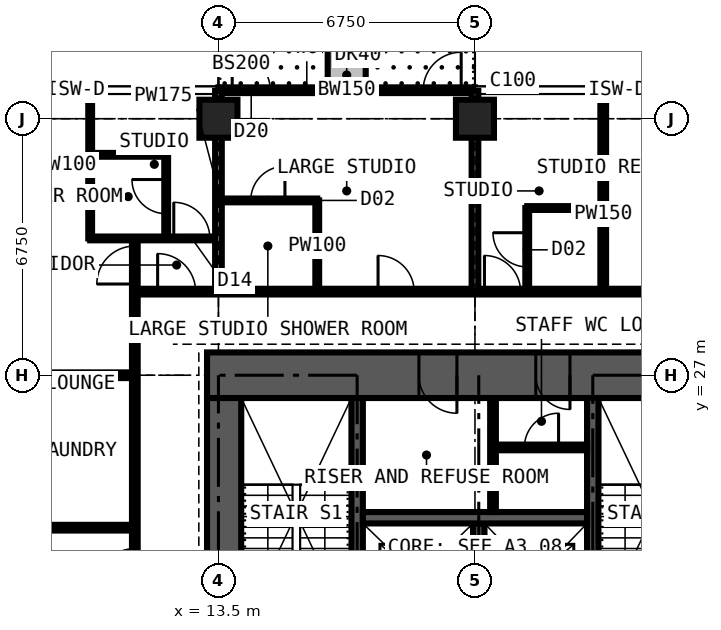
"""IFC4 building model, lengths in metres.
Left out: names, types, materials, properties, quantities, classifications, styles, units other than length and angle.
Written with IfcOpenShell. Run it as: python <this file> out.ifc"""

import sys

from ifc_helpers import new_model, si_unit, direction, frame, frame_2d, origin, origin_2d, place, context, subcontext, project, spatial, rectangle, extrude, element, fill, save


model = new_model("IFC4")
c1 = context("Model", 3, precision=1e-05, world=origin(), true_north=direction((0.0, 1.0)))
c2 = subcontext(c1, "Body", "Model", "MODEL_VIEW")
j1 = project(units=[si_unit("LENGTHUNIT", "METRE"), si_unit("PLANEANGLEUNIT", "RADIAN")], contexts=[c1])
p1 = place(None, origin())
s1 = spatial("IfcSite", under=j1, at=p1, CompositionType="ELEMENT")
p2 = place(p1, origin())
s2 = spatial("IfcBuilding", under=s1, at=p2, CompositionType="ELEMENT")
p3 = place(p2, frame((0.0, 0.0, 247.5)))
s3 = spatial("IfcBuildingStorey", under=s2, at=p3, CompositionType="ELEMENT", Elevation=247.5)
for number, where, z_axis, x_axis in (
    (1, (13.5, 33.75, 0.0), (0.0, 0.0, 1.0), (1.0, 0.0, 0.0)),
    (2, (20.25, 33.75, 0.0), (0.0, 0.0, 1.0), (1.0, 0.0, 0.0)),
):
    element("IfcColumn", number, at=place(p3, frame(where, z_axis=z_axis, x_axis=x_axis)), inside=s3, PredefinedType="COLUMN", context=c2, shape_type="SweptSolid", body=[
        extrude(rectangle(XDim=1.0, YDim=1.0, at=origin_2d()), origin(), (0.0, 0.0, 1.0), 3.6),
    ])
p4 = place(p3, frame((27.3, 27.0, 0.0), z_axis=(0.0, 0.0, 1.0), x_axis=(-1.0, 0.0, 0.0)))
e3 = element("IfcWall", 3, at=p4, inside=s3, PredefinedType="SHEAR", context=c2, shape_type="SweptSolid", body=[
    extrude(rectangle(XDim=14.1, YDim=1.2, at=frame_2d((7.05, 0.0))), origin(), (0.0, 0.0, 1.0), 3.6),
])
p5 = place(p4, frame((4.55, 0.0, 0.0)))
e4 = element("IfcOpeningElement", 4, at=p5, cuts=e3, PredefinedType="OPENING", context=c2, shape_type="SweptSolid", body=[
    extrude(rectangle(XDim=0.9, YDim=2.2, at=frame_2d((0.45, 1.1))), frame((0.0, 0.61, 0.0), z_axis=(0.0, -1.0, 0.0), x_axis=(1.0, 0.0, 0.0)), (0.0, 0.0, 1.0), 1.22),
])
p6 = place(p4, frame((7.525, 0.0, 0.0)))
e5 = element("IfcOpeningElement", 5, at=p6, cuts=e3, PredefinedType="OPENING", context=c2, shape_type="SweptSolid", body=[
    extrude(rectangle(XDim=1.0, YDim=2.2, at=frame_2d((0.5, 1.1))), frame((0.0, 0.61, 0.0), z_axis=(0.0, -1.0, 0.0), x_axis=(1.0, 0.0, 0.0)), (0.0, 0.0, 1.0), 1.22),
])
p7 = place(p3, frame((13.65, 26.4, 0.0), z_axis=(0.0, 0.0, 1.0), x_axis=(0.0, -1.0, 0.0)))
e6 = element("IfcWall", 6, at=p7, inside=s3, PredefinedType="SHEAR", context=c2, shape_type="SweptSolid", body=[
    extrude(rectangle(XDim=12.3, YDim=0.9, at=frame_2d((6.15, 0.0))), origin(), (0.0, 0.0, 1.0), 3.6),
])
p8 = place(p7, frame((7.45, 0.0, 0.0)))
e7 = element("IfcOpeningElement", 7, at=p8, cuts=e6, PredefinedType="OPENING", context=c2, shape_type="SweptSolid", body=[
    extrude(rectangle(XDim=1.2, YDim=2.2, at=frame_2d((0.6, 1.1))), frame((0.0, 0.46, 0.0), z_axis=(0.0, -1.0, 0.0), x_axis=(1.0, 0.0, 0.0)), (0.0, 0.0, 1.0), 0.92),
])
p9 = place(p3, frame((13.5, 34.5, 0.0), z_axis=(0.0, 0.0, 1.0), x_axis=(1.0, 0.0, 0.0)))
e8 = element("IfcWall", 8, at=p9, inside=s3, PredefinedType="SOLIDWALL", context=c2, shape_type="SweptSolid", body=[
    extrude(rectangle(XDim=6.75, YDim=0.15, at=frame_2d((3.375, 0.0))), origin(), (0.0, 0.0, 1.0), 3.375),
])
p10 = place(p9, frame((0.363, 0.0, 0.0)))
e9 = element("IfcOpeningElement", 9, at=p10, cuts=e8, PredefinedType="OPENING", context=c2, shape_type="SweptSolid", body=[
    extrude(rectangle(XDim=1.0, YDim=2.2, at=frame_2d((0.5, 1.1))), frame((0.0, 0.085, 0.0), z_axis=(0.0, -1.0, 0.0), x_axis=(1.0, 0.0, 0.0)), (0.0, 0.0, 1.0), 0.17),
])
p11 = place(p9, frame((1.725, 0.0, 0.9)))
e10 = element("IfcOpeningElement", 10, at=p11, cuts=e8, PredefinedType="OPENING", context=c2, shape_type="SweptSolid", body=[
    extrude(rectangle(XDim=1.2, YDim=1.8, at=frame_2d((0.6, 0.9))), frame((0.0, 0.085, 0.0), z_axis=(0.0, -1.0, 0.0), x_axis=(1.0, 0.0, 0.0)), (0.0, 0.0, 1.0), 0.17),
])
p12 = place(p9, frame((5.387, 0.0, 0.0)))
e11 = element("IfcOpeningElement", 11, at=p12, cuts=e8, PredefinedType="OPENING", context=c2, shape_type="SweptSolid", body=[
    extrude(rectangle(XDim=1.0, YDim=2.2, at=frame_2d((0.5, 1.1))), frame((0.0, 0.085, 0.0), z_axis=(0.0, -1.0, 0.0), x_axis=(1.0, 0.0, 0.0)), (0.0, 0.0, 1.0), 0.17),
])
p13 = place(p9, frame((3.825, 0.0, 0.9)))
e12 = element("IfcOpeningElement", 12, at=p13, cuts=e8, PredefinedType="OPENING", context=c2, shape_type="SweptSolid", body=[
    extrude(rectangle(XDim=1.2, YDim=1.8, at=frame_2d((0.6, 0.9))), frame((0.0, 0.085, 0.0), z_axis=(0.0, -1.0, 0.0), x_axis=(1.0, 0.0, 0.0)), (0.0, 0.0, 1.0), 0.17),
])
p14 = place(p3, frame((16.875, 34.6, 0.0), z_axis=(0.0, 0.0, 1.0), x_axis=(0.0, 1.0, 0.0)))
e13 = element("IfcWall", 13, at=p14, inside=s3, PredefinedType="USERDEFINED", context=c2, shape_type="SweptSolid", body=[
    extrude(rectangle(XDim=2.2, YDim=1.0, at=frame_2d((1.1, 0.0))), origin(), (0.0, 0.0, 1.0), 0.9),
])
for number, where, z_axis, x_axis in (
    (14, (17.15, 20.3, 0.0), (0.0, 0.0, 1.0), (0.0, 1.0, 0.0)),
    (15, (23.35, 20.3, 0.0), (0.0, 0.0, 1.0), (0.0, 1.0, 0.0)),
):
    element("IfcWall", number, at=place(p3, frame(where, z_axis=z_axis, x_axis=x_axis)), inside=s3, PredefinedType="SHEAR", context=c2, shape_type="SweptSolid", body=[
        extrude(rectangle(XDim=6.1, YDim=0.3, at=frame_2d((3.05, 0.0))), origin(), (0.0, 0.0, 1.0), 3.6),
    ])
p15 = place(p3, frame((20.35, 20.3, 0.0), z_axis=(0.0, 0.0, 1.0), x_axis=(0.0, 1.0, 0.0)))
e16 = element("IfcWall", 16, at=p15, inside=s3, PredefinedType="SHEAR", context=c2, shape_type="SweptSolid", body=[
    extrude(rectangle(XDim=2.8, YDim=0.3, at=frame_2d((1.4, 0.0))), origin(), (0.0, 0.0, 1.0), 3.6),
])
p16 = place(p3, frame((17.3, 23.25, 0.0), z_axis=(0.0, 0.0, 1.0), x_axis=(1.0, 0.0, 0.0)))
e17 = element("IfcWall", 17, at=p16, inside=s3, PredefinedType="SHEAR", context=c2, shape_type="SweptSolid", body=[
    extrude(rectangle(XDim=5.9, YDim=0.3, at=frame_2d((2.95, 0.0))), origin(), (0.0, 0.0, 1.0), 3.6),
])
p17 = place(p3, frame((20.725, 23.4, 0.0), z_axis=(0.0, 0.0, 1.0), x_axis=(0.0, 1.0, 0.0)))
e18 = element("IfcWall", 18, at=p17, inside=s3, PredefinedType="PARTITIONING", context=c2, shape_type="SweptSolid", body=[
    extrude(rectangle(XDim=3.0, YDim=0.15, at=frame_2d((1.5, 0.0))), origin(), (0.0, 0.0, 1.0), 3.375),
])
p18 = place(p3, frame((20.8, 25.1, 0.0), z_axis=(0.0, 0.0, 1.0), x_axis=(1.0, 0.0, 0.0)))
e19 = element("IfcWall", 19, at=p18, inside=s3, PredefinedType="PARTITIONING", context=c2, shape_type="SweptSolid", body=[
    extrude(rectangle(XDim=2.4, YDim=0.15, at=frame_2d((1.2, 0.0))), origin(), (0.0, 0.0, 1.0), 3.375),
])
p19 = place(p18, frame((0.75, 0.0, 0.0)))
e20 = element("IfcOpeningElement", 20, at=p19, cuts=e19, PredefinedType="OPENING", context=c2, shape_type="SweptSolid", body=[
    extrude(rectangle(XDim=0.9, YDim=2.2, at=frame_2d((0.45, 1.1))), frame((0.0, 0.085, 0.0), z_axis=(0.0, -1.0, 0.0), x_axis=(1.0, 0.0, 0.0)), (0.0, 0.0, 1.0), 0.17),
])
p20 = place(p3, frame((3.35, 27.0, 0.0), z_axis=(0.0, 0.0, 1.0), x_axis=(1.0, 0.0, 0.0)))
e21 = element("IfcWall", 21, at=p20, inside=s3, PredefinedType="PARTITIONING", context=c2, shape_type="SweptSolid", body=[
    extrude(rectangle(XDim=7.95, YDim=0.15, at=frame_2d((3.975, 0.0))), origin(), (0.0, 0.0, 1.0), 2.877),
])
p21 = place(p3, frame((4.85, 22.988, 0.0), z_axis=(0.0, 0.0, 1.0), x_axis=(1.0, 0.0, 0.0)))
e22 = element("IfcWall", 22, at=p21, inside=s3, PredefinedType="PARTITIONING", context=c2, shape_type="SweptSolid", body=[
    extrude(rectangle(XDim=6.45, YDim=0.15, at=frame_2d((3.225, 0.0))), origin(), (0.0, 0.0, 1.0), 3.375),
])
p22 = place(p21, frame((2.75, 0.0, 0.0)))
e23 = element("IfcOpeningElement", 23, at=p22, cuts=e22, PredefinedType="OPENING", context=c2, shape_type="SweptSolid", body=[
    extrude(rectangle(XDim=0.95, YDim=2.2, at=frame_2d((0.475, 1.1))), frame((0.0, 0.085, 0.0), z_axis=(0.0, -1.0, 0.0), x_axis=(1.0, 0.0, 0.0)), (0.0, 0.0, 1.0), 0.17),
])
p23 = place(p3, frame((10.125, 30.6, 0.0), z_axis=(0.0, 0.0, 1.0), x_axis=(0.0, 1.0, 0.0)))
e24 = element("IfcWall", 24, at=p23, inside=s3, PredefinedType="PARTITIONING", context=c2, shape_type="SweptSolid", body=[
    extrude(rectangle(XDim=3.884, YDim=0.1, at=frame_2d((1.942, 0.0))), origin(), (0.0, 0.0, 1.0), 3.375),
])
p24 = place(p3, frame((10.125, 30.6, 0.0), z_axis=(0.0, 0.0, 1.0), x_axis=(1.0, 0.0, 0.0)))
e25 = element("IfcWall", 25, at=p24, inside=s3, PredefinedType="PARTITIONING", context=c2, shape_type="SweptSolid", body=[
    extrude(rectangle(XDim=3.375, YDim=0.1, at=frame_2d((1.688, 0.0))), origin(), (0.0, 0.0, 1.0), 3.375),
])
p25 = place(p24, frame((2.2, 0.0, 0.0)))
e26 = element("IfcOpeningElement", 26, at=p25, cuts=e25, PredefinedType="OPENING", context=c2, shape_type="SweptSolid", body=[
    extrude(rectangle(XDim=0.95, YDim=2.2, at=frame_2d((0.475, 1.1))), frame((0.0, 0.06, 0.0), z_axis=(0.0, -1.0, 0.0), x_axis=(1.0, 0.0, 0.0)), (0.0, 0.0, 1.0), 0.12),
])
p26 = place(p3, frame((10.125, 32.8, 0.0), z_axis=(0.0, 0.0, 1.0), x_axis=(1.0, 0.0, 0.0)))
e27 = element("IfcWall", 27, at=p26, inside=s3, PredefinedType="PARTITIONING", context=c2, shape_type="SweptSolid", body=[
    extrude(rectangle(XDim=2.0, YDim=0.1, at=frame_2d((1.0, 0.0))), origin(), (0.0, 0.0, 1.0), 3.375),
])
p27 = place(p3, frame((11.3, 11.3, 0.0), z_axis=(0.0, 0.0, 1.0), x_axis=(0.0, 1.0, 0.0)))
e28 = element("IfcWall", 28, at=p27, inside=s3, PredefinedType="PARTITIONING", context=c2, shape_type="SweptSolid", body=[
    extrude(rectangle(XDim=19.3, YDim=0.15, at=frame_2d((9.65, 0.0))), origin(), (0.0, 0.0, 1.0), 3.375),
])
p28 = place(p27, frame((18.1, 0.0, 0.0)))
e29 = element("IfcOpeningElement", 29, at=p28, cuts=e28, PredefinedType="OPENING", context=c2, shape_type="SweptSolid", body=[
    extrude(rectangle(XDim=1.0, YDim=2.2, at=frame_2d((0.5, 1.1))), frame((0.0, 0.085, 0.0), z_axis=(0.0, -1.0, 0.0), x_axis=(1.0, 0.0, 0.0)), (0.0, 0.0, 1.0), 0.17),
])
p29 = place(p27, frame((10.137, 0.0, 0.0)))
e30 = element("IfcOpeningElement", 30, at=p29, cuts=e28, PredefinedType="OPENING", context=c2, shape_type="SweptSolid", body=[
    extrude(rectangle(XDim=1.0, YDim=2.2, at=frame_2d((0.5, 1.1))), frame((0.0, 0.085, 0.0), z_axis=(0.0, -1.0, 0.0), x_axis=(1.0, 0.0, 0.0)), (0.0, 0.0, 1.0), 0.17),
])
p30 = place(p3, frame((11.3, 29.2, 0.0), z_axis=(0.0, 0.0, 1.0), x_axis=(1.0, 0.0, 0.0)))
e31 = element("IfcWall", 31, at=p30, inside=s3, PredefinedType="PARTITIONING", context=c2, shape_type="SweptSolid", body=[
    extrude(rectangle(XDim=19.809, YDim=0.15, at=frame_2d((9.904, 0.0))), origin(), (0.0, 0.0, 1.0), 3.375),
])
p31 = place(p30, frame((14.625, 0.0, 0.0)))
e32 = element("IfcOpeningElement", 32, at=p31, cuts=e31, PredefinedType="OPENING", context=c2, shape_type="SweptSolid", body=[
    extrude(rectangle(XDim=1.0, YDim=2.2, at=frame_2d((0.5, 1.1))), frame((0.0, 0.085, 0.0), z_axis=(0.0, -1.0, 0.0), x_axis=(1.0, 0.0, 0.0)), (0.0, 0.0, 1.0), 0.17),
])
p32 = place(p30, frame((6.4, 0.0, 0.0)))
e33 = element("IfcOpeningElement", 33, at=p32, cuts=e31, PredefinedType="OPENING", context=c2, shape_type="SweptSolid", body=[
    extrude(rectangle(XDim=0.95, YDim=2.2, at=frame_2d((0.475, 1.1))), frame((0.0, 0.085, 0.0), z_axis=(0.0, -1.0, 0.0), x_axis=(1.0, 0.0, 0.0)), (0.0, 0.0, 1.0), 0.17),
])
p33 = place(p30, frame((9.2, 0.0, 0.0)))
e34 = element("IfcOpeningElement", 34, at=p33, cuts=e31, PredefinedType="OPENING", context=c2, shape_type="SweptSolid", body=[
    extrude(rectangle(XDim=0.95, YDim=2.2, at=frame_2d((0.475, 1.1))), frame((0.0, 0.085, 0.0), z_axis=(0.0, -1.0, 0.0), x_axis=(1.0, 0.0, 0.0)), (0.0, 0.0, 1.0), 0.17),
])
p34 = place(p30, frame((0.6, 0.0, 0.0)))
e35 = element("IfcOpeningElement", 35, at=p34, cuts=e31, PredefinedType="OPENING", context=c2, shape_type="SweptSolid", body=[
    extrude(rectangle(XDim=1.0, YDim=2.2, at=frame_2d((0.5, 1.1))), frame((0.0, 0.085, 0.0), z_axis=(0.0, -1.0, 0.0), x_axis=(1.0, 0.0, 0.0)), (0.0, 0.0, 1.0), 0.17),
])
p35 = place(p3, frame((12.125, 30.6, 0.0), z_axis=(0.0, 0.0, 1.0), x_axis=(0.0, 1.0, 0.0)))
e36 = element("IfcWall", 36, at=p35, inside=s3, PredefinedType="PARTITIONING", context=c2, shape_type="SweptSolid", body=[
    extrude(rectangle(XDim=2.2, YDim=0.1, at=frame_2d((1.1, 0.0))), origin(), (0.0, 0.0, 1.0), 3.375),
])
p36 = place(p35, frame((0.65, 0.0, 0.0)))
e37 = element("IfcOpeningElement", 37, at=p36, cuts=e36, PredefinedType="OPENING", context=c2, shape_type="SweptSolid", body=[
    extrude(rectangle(XDim=0.9, YDim=2.2, at=frame_2d((0.45, 1.1))), frame((0.0, 0.06, 0.0), z_axis=(0.0, -1.0, 0.0), x_axis=(1.0, 0.0, 0.0)), (0.0, 0.0, 1.0), 0.12),
])
p37 = place(p3, frame((13.5, 29.2, 0.0), z_axis=(0.0, 0.0, 1.0), x_axis=(0.0, 1.0, 0.0)))
e38 = element("IfcWall", 38, at=p37, inside=s3, PredefinedType="PARTITIONING", context=c2, shape_type="SweptSolid", body=[
    extrude(rectangle(XDim=5.284, YDim=0.175, at=frame_2d((2.642, 0.0))), origin(), (0.0, 0.0, 1.0), 2.61),
])
p38 = place(p3, frame((13.5, 31.6, 0.0), z_axis=(0.0, 0.0, 1.0), x_axis=(1.0, 0.0, 0.0)))
e39 = element("IfcWall", 39, at=p38, inside=s3, PredefinedType="PARTITIONING", context=c2, shape_type="SweptSolid", body=[
    extrude(rectangle(XDim=2.6, YDim=0.1, at=frame_2d((1.3, 0.0))), origin(), (0.0, 0.0, 1.0), 3.375),
])
p39 = place(p38, frame((0.85, 0.0, 0.0)))
e40 = element("IfcOpeningElement", 40, at=p39, cuts=e39, PredefinedType="OPENING", context=c2, shape_type="SweptSolid", body=[
    extrude(rectangle(XDim=0.9, YDim=2.2, at=frame_2d((0.45, 1.1))), frame((0.0, 0.06, 0.0), z_axis=(0.0, -1.0, 0.0), x_axis=(1.0, 0.0, 0.0)), (0.0, 0.0, 1.0), 0.12),
])
p40 = place(p3, frame((16.1, 29.2, 0.0), z_axis=(0.0, 0.0, 1.0), x_axis=(0.0, 1.0, 0.0)))
e41 = element("IfcWall", 41, at=p40, inside=s3, PredefinedType="PARTITIONING", context=c2, shape_type="SweptSolid", body=[
    extrude(rectangle(XDim=2.4, YDim=0.1, at=frame_2d((1.2, 0.0))), origin(), (0.0, 0.0, 1.0), 3.375),
])
p41 = place(p3, frame((20.25, 29.2, 0.0), z_axis=(0.0, 0.0, 1.0), x_axis=(0.0, 1.0, 0.0)))
e42 = element("IfcWall", 42, at=p41, inside=s3, PredefinedType="PARTITIONING", context=c2, shape_type="SweptSolid", body=[
    extrude(rectangle(XDim=5.284, YDim=0.175, at=frame_2d((2.642, 0.0))), origin(), (0.0, 0.0, 1.0), 2.61),
])
p42 = place(p3, frame((21.625, 29.2, 0.0), z_axis=(0.0, 0.0, 1.0), x_axis=(0.0, 1.0, 0.0)))
e43 = element("IfcWall", 43, at=p42, inside=s3, PredefinedType="PARTITIONING", context=c2, shape_type="SweptSolid", body=[
    extrude(rectangle(XDim=2.2, YDim=0.1, at=frame_2d((1.1, 0.0))), origin(), (0.0, 0.0, 1.0), 3.375),
])
p43 = place(p42, frame((0.65, 0.0, 0.0)))
e44 = element("IfcOpeningElement", 44, at=p43, cuts=e43, PredefinedType="OPENING", context=c2, shape_type="SweptSolid", body=[
    extrude(rectangle(XDim=0.9, YDim=2.2, at=frame_2d((0.45, 1.1))), frame((0.0, 0.06, 0.0), z_axis=(0.0, -1.0, 0.0), x_axis=(1.0, 0.0, 0.0)), (0.0, 0.0, 1.0), 0.12),
])
p44 = place(p3, frame((21.625, 31.4, 0.0), z_axis=(0.0, 0.0, 1.0), x_axis=(1.0, 0.0, 0.0)))
e45 = element("IfcWall", 45, at=p44, inside=s3, PredefinedType="PARTITIONING", context=c2, shape_type="SweptSolid", body=[
    extrude(rectangle(XDim=2.0, YDim=0.1, at=frame_2d((1.0, 0.0))), origin(), (0.0, 0.0, 1.0), 3.375),
])
p45 = place(p3, frame((23.625, 29.2, 0.0), z_axis=(0.0, 0.0, 1.0), x_axis=(0.0, 1.0, 0.0)))
e46 = element("IfcWall", 46, at=p45, inside=s3, PredefinedType="PARTITIONING", context=c2, shape_type="SweptSolid", body=[
    extrude(rectangle(XDim=5.284, YDim=0.15, at=frame_2d((2.642, 0.0))), origin(), (0.0, 0.0, 1.0), 3.375),
])
p46 = place(p10, origin())
e47 = element("IfcDoor", 47, at=p46, inside=s3, OperationType="SINGLE_SWING_LEFT", PredefinedType="DOOR", context=c2, shape_type="SweptSolid", body=[
    extrude(rectangle(XDim=1.0, YDim=2.2, at=frame_2d((0.5, 1.1))), frame((0.0, 0.025, 0.0), z_axis=(0.0, -1.0, 0.0), x_axis=(1.0, 0.0, 0.0)), (0.0, 0.0, 1.0), 0.05),
])
fill(e9, e47)
p47 = place(p11, origin())
e48 = element("IfcWindow", 48, at=p47, inside=s3, PartitioningType="SINGLE_PANEL", PredefinedType="WINDOW", context=c2, shape_type="SweptSolid", body=[
    extrude(rectangle(XDim=1.2, YDim=1.8, at=frame_2d((0.6, 0.9))), frame((0.0, 0.03, 0.0), z_axis=(0.0, -1.0, 0.0), x_axis=(1.0, 0.0, 0.0)), (0.0, 0.0, 1.0), 0.06),
])
fill(e10, e48)
p48 = place(p12, origin())
e49 = element("IfcDoor", 49, at=p48, inside=s3, OperationType="SINGLE_SWING_RIGHT", PredefinedType="DOOR", context=c2, shape_type="SweptSolid", body=[
    extrude(rectangle(XDim=1.0, YDim=2.2, at=frame_2d((0.5, 1.1))), frame((0.0, 0.025, 0.0), z_axis=(0.0, -1.0, 0.0), x_axis=(1.0, 0.0, 0.0)), (0.0, 0.0, 1.0), 0.05),
])
fill(e11, e49)
p49 = place(p13, origin())
e50 = element("IfcWindow", 50, at=p49, inside=s3, PartitioningType="SINGLE_PANEL", PredefinedType="WINDOW", context=c2, shape_type="SweptSolid", body=[
    extrude(rectangle(XDim=1.2, YDim=1.8, at=frame_2d((0.6, 0.9))), frame((0.0, 0.03, 0.0), z_axis=(0.0, -1.0, 0.0), x_axis=(1.0, 0.0, 0.0)), (0.0, 0.0, 1.0), 0.06),
])
fill(e12, e50)
p50 = place(p19, origin())
e51 = element("IfcDoor", 51, at=p50, inside=s3, OperationType="SINGLE_SWING_RIGHT", PredefinedType="DOOR", context=c2, shape_type="SweptSolid", body=[
    extrude(rectangle(XDim=0.9, YDim=2.2, at=frame_2d((0.45, 1.1))), frame((0.0, 0.025, 0.0), z_axis=(0.0, -1.0, 0.0), x_axis=(1.0, 0.0, 0.0)), (0.0, 0.0, 1.0), 0.05),
])
fill(e20, e51)
p51 = place(p5, origin())
e52 = element("IfcDoor", 52, at=p51, inside=s3, OperationType="SINGLE_SWING_LEFT", PredefinedType="DOOR", context=c2, shape_type="SweptSolid", body=[
    extrude(rectangle(XDim=0.9, YDim=2.2, at=frame_2d((0.45, 1.1))), frame((0.0, 0.4, 0.0), z_axis=(0.0, -1.0, 0.0), x_axis=(1.0, 0.0, 0.0)), (0.0, 0.0, 1.0), 0.8),
])
fill(e4, e52)
p52 = place(p6, origin())
e53 = element("IfcDoor", 53, at=p52, inside=s3, OperationType="SINGLE_SWING_LEFT", PredefinedType="DOOR", context=c2, shape_type="SweptSolid", body=[
    extrude(rectangle(XDim=1.0, YDim=2.2, at=frame_2d((0.5, 1.1))), frame((0.0, 0.025, 0.0), z_axis=(0.0, -1.0, 0.0), x_axis=(1.0, 0.0, 0.0)), (0.0, 0.0, 1.0), 0.05),
])
fill(e5, e53)
p53 = place(p32, origin())
e54 = element("IfcDoor", 54, at=p53, inside=s3, OperationType="SINGLE_SWING_LEFT", PredefinedType="DOOR", context=c2, shape_type="SweptSolid", body=[
    extrude(rectangle(XDim=0.95, YDim=2.2, at=frame_2d((0.475, 1.1))), frame((0.0, 0.025, 0.0), z_axis=(0.0, -1.0, 0.0), x_axis=(1.0, 0.0, 0.0)), (0.0, 0.0, 1.0), 0.05),
])
fill(e33, e54)
p54 = place(p39, origin())
e55 = element("IfcDoor", 55, at=p54, inside=s3, OperationType="SINGLE_SWING_RIGHT", PredefinedType="DOOR", context=c2, shape_type="SweptSolid", body=[
    extrude(rectangle(XDim=0.9, YDim=2.2, at=frame_2d((0.45, 1.1))), frame((0.0, 0.025, 0.0), z_axis=(0.0, -1.0, 0.0), x_axis=(1.0, 0.0, 0.0)), (0.0, 0.0, 1.0), 0.05),
])
fill(e40, e55)
p55 = place(p25, origin())
e56 = element("IfcDoor", 56, at=p55, inside=s3, OperationType="SINGLE_SWING_LEFT", PredefinedType="DOOR", context=c2, shape_type="SweptSolid", body=[
    extrude(rectangle(XDim=0.95, YDim=2.2, at=frame_2d((0.475, 1.1))), frame((0.0, 0.025, 0.0), z_axis=(0.0, -1.0, 0.0), x_axis=(1.0, 0.0, 0.0)), (0.0, 0.0, 1.0), 0.05),
])
fill(e26, e56)
p56 = place(p36, origin())
e57 = element("IfcDoor", 57, at=p56, inside=s3, OperationType="SINGLE_SWING_RIGHT", PredefinedType="DOOR", context=c2, shape_type="SweptSolid", body=[
    extrude(rectangle(XDim=0.9, YDim=2.2, at=frame_2d((0.45, 1.1))), frame((0.0, 0.025, 0.0), z_axis=(0.0, -1.0, 0.0), x_axis=(1.0, 0.0, 0.0)), (0.0, 0.0, 1.0), 0.05),
])
fill(e37, e57)
p57 = place(p33, origin())
e58 = element("IfcDoor", 58, at=p57, inside=s3, OperationType="SINGLE_SWING_LEFT", PredefinedType="DOOR", context=c2, shape_type="SweptSolid", body=[
    extrude(rectangle(XDim=0.95, YDim=2.2, at=frame_2d((0.475, 1.1))), frame((0.0, 0.025, 0.0), z_axis=(0.0, -1.0, 0.0), x_axis=(1.0, 0.0, 0.0)), (0.0, 0.0, 1.0), 0.05),
])
fill(e34, e58)
p58 = place(p43, origin())
e59 = element("IfcDoor", 59, at=p58, inside=s3, OperationType="SINGLE_SWING_RIGHT", PredefinedType="DOOR", context=c2, shape_type="SweptSolid", body=[
    extrude(rectangle(XDim=0.9, YDim=2.2, at=frame_2d((0.45, 1.1))), frame((0.0, 0.025, 0.0), z_axis=(0.0, -1.0, 0.0), x_axis=(1.0, 0.0, 0.0)), (0.0, 0.0, 1.0), 0.05),
])
fill(e44, e59)
p59 = place(p34, origin())
e60 = element("IfcDoor", 60, at=p59, inside=s3, OperationType="SINGLE_SWING_LEFT", PredefinedType="DOOR", context=c2, shape_type="SweptSolid", body=[
    extrude(rectangle(XDim=1.0, YDim=2.2, at=frame_2d((0.5, 1.1))), frame((0.0, 0.025, 0.0), z_axis=(0.0, -1.0, 0.0), x_axis=(1.0, 0.0, 0.0)), (0.0, 0.0, 1.0), 0.05),
])
fill(e35, e60)
p60 = place(p28, origin())
e61 = element("IfcDoor", 61, at=p60, inside=s3, OperationType="SINGLE_SWING_LEFT", PredefinedType="DOOR", context=c2, shape_type="SweptSolid", body=[
    extrude(rectangle(XDim=1.0, YDim=2.2, at=frame_2d((0.5, 1.1))), frame((0.0, 0.025, 0.0), z_axis=(0.0, -1.0, 0.0), x_axis=(1.0, 0.0, 0.0)), (0.0, 0.0, 1.0), 0.05),
])
fill(e29, e61)
p61 = place(p29, origin())
e62 = element("IfcDoor", 62, at=p61, inside=s3, OperationType="SINGLE_SWING_LEFT", PredefinedType="DOOR", context=c2, shape_type="SweptSolid", body=[
    extrude(rectangle(XDim=1.0, YDim=2.2, at=frame_2d((0.5, 1.1))), frame((0.0, 0.025, 0.0), z_axis=(0.0, -1.0, 0.0), x_axis=(1.0, 0.0, 0.0)), (0.0, 0.0, 1.0), 0.05),
])
fill(e30, e62)
save(model, sys.argv[1])
